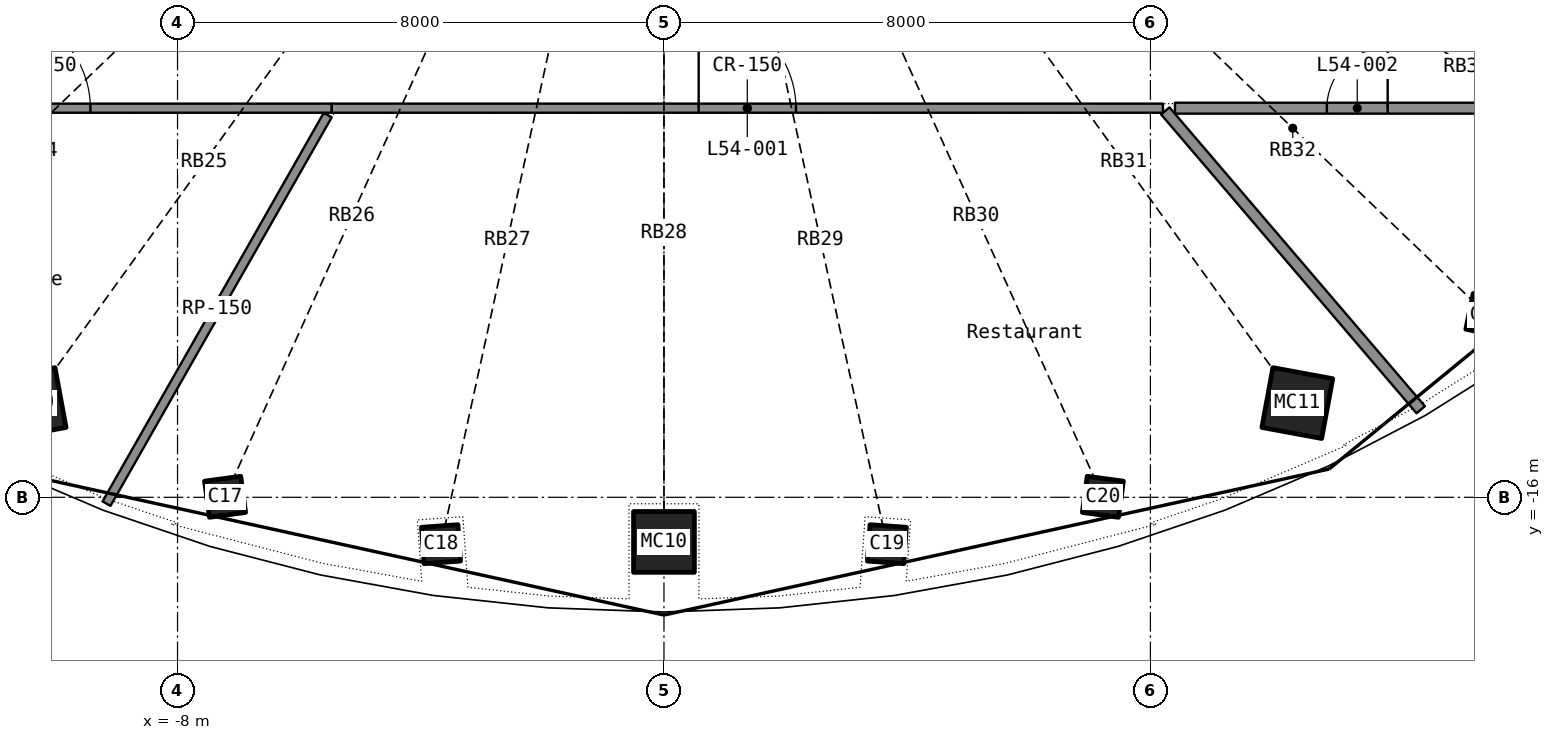
"""IFC4 building model, lengths in metres.
Left out: names, types, materials, properties, quantities, classifications, styles, units other than length and angle.
Written with IfcOpenShell. Run it as: python <this file> out.ifc"""

import sys

from ifc_helpers import new_model, si_unit, direction, frame, frame_2d, origin, origin_2d, place, context, subcontext, project, spatial, rectangle, hollow_rectangle, extrude, element, fill, save


model = new_model("IFC4")
c1 = context("Model", 3, precision=1e-05, world=origin(), true_north=direction((0.0, 1.0)))
c2 = subcontext(c1, "Body", "Model", "MODEL_VIEW")
j1 = project(units=[si_unit("LENGTHUNIT", "METRE"), si_unit("PLANEANGLEUNIT", "RADIAN")], contexts=[c1])
p1 = place(None, origin())
s1 = spatial("IfcSite", under=j1, at=p1, CompositionType="ELEMENT")
p2 = place(p1, origin())
s2 = spatial("IfcBuilding", under=s1, at=p2, CompositionType="ELEMENT")
p3 = place(p2, frame((0.0, 0.0, 224.5)))
s3 = spatial("IfcBuildingStorey", under=s2, at=p3, CompositionType="ELEMENT", Elevation=224.5)
p4 = place(p3, frame((-10.416, -14.45, 0.0), z_axis=(0.017280237, 0.024535299, 0.999549605), x_axis=(-0.908584408, 0.41766567, 0.005455459)))
e1 = element("IfcColumn", 1, at=p4, inside=s3, PredefinedType="COLUMN", context=c2, shape_type="SweptSolid", body=[
    extrude(hollow_rectangle(XDim=1.0, YDim=1.0, WallThickness=0.032, at=origin_2d()), origin(), (0.0, 0.0, 1.0), 3.702),
])
for number, where, z_axis, x_axis in (
    (2, (-7.218, -15.992, 0.0), (0.012, 0.027, 1.0), (-0.96, 0.279, 0.004)),
    (3, (-3.666, -16.771, 0.0), (0.006, 0.028, 1.0), (-0.99, 0.14, 0.002)),
):
    element("IfcColumn", number, at=place(p3, frame(where, z_axis=z_axis, x_axis=x_axis)), inside=s3, PredefinedType="COLUMN", context=c2, shape_type="SweptSolid", body=[
        extrude(hollow_rectangle(XDim=0.6, YDim=0.6, WallThickness=0.025, at=origin_2d()), origin(), (0.0, 0.0, 1.0), 3.701),
    ])
p5 = place(p3, frame((0.0, -16.734, 0.0), z_axis=(0.0, 0.02836206, 0.999597716), x_axis=(-1.0, 0.0, 0.0)))
e4 = element("IfcColumn", 4, at=p5, inside=s3, PredefinedType="COLUMN", context=c2, shape_type="SweptSolid", body=[
    extrude(hollow_rectangle(XDim=1.0, YDim=1.0, WallThickness=0.032, at=origin_2d()), origin(), (0.0, 0.0, 1.0), 3.701),
])
for number, where, z_axis, x_axis in (
    (5, (3.666, -16.771, 0.0), (-0.006, 0.028, 1.0), (-0.99, -0.14, -0.002)),
    (6, (7.218, -15.992, 0.0), (-0.012, 0.027, 1.0), (-0.96, -0.279, -0.004)),
):
    element("IfcColumn", number, at=place(p3, frame(where, z_axis=z_axis, x_axis=x_axis)), inside=s3, PredefinedType="COLUMN", context=c2, shape_type="SweptSolid", body=[
        extrude(hollow_rectangle(XDim=0.6, YDim=0.6, WallThickness=0.025, at=origin_2d()), origin(), (0.0, 0.0, 1.0), 3.701),
    ])
p6 = place(p3, frame((10.416, -14.45, 0.0), z_axis=(-0.017280237, 0.024535299, 0.999549605), x_axis=(-0.908584408, -0.41766567, -0.005455459)))
e7 = element("IfcColumn", 7, at=p6, inside=s3, PredefinedType="COLUMN", context=c2, shape_type="SweptSolid", body=[
    extrude(hollow_rectangle(XDim=1.0, YDim=1.0, WallThickness=0.032, at=origin_2d()), origin(), (0.0, 0.0, 1.0), 3.702),
])
p7 = place(p3, frame((13.542, -13.002, 0.0), z_axis=(-0.022226156, 0.021698532, 0.999517469), x_axis=(-0.828721704, -0.559625686, -0.006279272)))
e8 = element("IfcColumn", 8, at=p7, inside=s3, PredefinedType="COLUMN", context=c2, shape_type="SweptSolid", body=[
    extrude(hollow_rectangle(XDim=0.6, YDim=0.6, WallThickness=0.025, at=origin_2d()), origin(), (0.0, 0.0, 1.0), 3.702),
])
p8 = place(p3, frame((-5.465, -9.6, 0.0), z_axis=(0.0, 0.0, 1.0), x_axis=(1.0, 0.0, 0.0)))
e9 = element("IfcWall", 9, at=p8, inside=s3, PredefinedType="PARTITIONING", context=c2, shape_type="SweptSolid", body=[
    extrude(rectangle(XDim=13.671, YDim=0.15, at=frame_2d((6.836, 0.0))), origin(), (0.0, 0.0, 1.0), 2.4),
])
p9 = place(p8, frame((6.036, 0.0, 0.0)))
e10 = element("IfcOpeningElement", 10, at=p9, cuts=e9, PredefinedType="OPENING", context=c2, shape_type="SweptSolid", body=[
    extrude(rectangle(XDim=1.6, YDim=2.4, at=frame_2d((0.8, 1.2))), frame((0.0, 0.085, 0.0), z_axis=(0.0, -1.0, 0.0), x_axis=(1.0, 0.0, 0.0)), (0.0, 0.0, 1.0), 0.17),
])
p10 = place(p3, frame((-15.0, -9.6, 0.0), z_axis=(0.0, 0.0, 1.0), x_axis=(1.0, 0.0, 0.0)))
e11 = element("IfcWall", 11, at=p10, inside=s3, PredefinedType="PARTITIONING", context=c2, shape_type="SweptSolid", body=[
    extrude(rectangle(XDim=9.534, YDim=0.15, at=frame_2d((4.767, 0.0))), origin(), (0.0, 0.0, 1.0), 2.4),
])
p11 = place(p10, frame((3.967, 0.0, 0.0)))
e12 = element("IfcOpeningElement", 12, at=p11, cuts=e11, PredefinedType="OPENING", context=c2, shape_type="SweptSolid", body=[
    extrude(rectangle(XDim=1.6, YDim=2.4, at=frame_2d((0.8, 1.2))), frame((0.0, 0.085, 0.0), z_axis=(0.0, -1.0, 0.0), x_axis=(1.0, 0.0, 0.0)), (0.0, 0.0, 1.0), 0.17),
])
p12 = place(p3, frame((-5.53, -9.714, 0.0), z_axis=(0.0, 0.0, 1.0), x_axis=(-0.494743906, -0.869038818, 0.0)))
e13 = element("IfcWall", 13, at=p12, inside=s3, PredefinedType="PARTITIONING", context=c2, shape_type="SweptSolid", body=[
    extrude(rectangle(XDim=7.354, YDim=0.15, at=frame_2d((3.677, 0.0))), origin(), (0.0, 0.0, 1.0), 2.4),
])
p13 = place(p3, frame((12.446, -14.56, 0.0), z_axis=(0.0, 0.0, 1.0), x_axis=(-0.649761442, 0.76013819, 0.0)))
e14 = element("IfcWall", 14, at=p13, inside=s3, PredefinedType="PARTITIONING", context=c2, shape_type="SweptSolid", body=[
    extrude(rectangle(XDim=6.465, YDim=0.18, at=frame_2d((3.233, 0.0))), origin(), (0.0, 0.0, 1.0), 2.4),
])
p14 = place(p3, frame((8.404, -9.6, 0.0), z_axis=(0.0, 0.0, 1.0), x_axis=(1.0, 0.0, 0.0)))
e15 = element("IfcWall", 15, at=p14, inside=s3, PredefinedType="PARTITIONING", context=c2, shape_type="SweptSolid", body=[
    extrude(rectangle(XDim=5.996, YDim=0.18, at=frame_2d((2.998, 0.0))), origin(), (0.0, 0.0, 1.0), 2.4),
])
p15 = place(p14, frame((2.498, 0.0, 0.0)))
e16 = element("IfcOpeningElement", 16, at=p15, cuts=e15, PredefinedType="OPENING", context=c2, shape_type="SweptSolid", body=[
    extrude(rectangle(XDim=1.0, YDim=2.1, at=frame_2d((0.5, 1.05))), frame((0.0, 0.1, 0.0), z_axis=(0.0, -1.0, 0.0), x_axis=(1.0, 0.0, 0.0)), (0.0, 0.0, 1.0), 0.2),
])
p16 = place(p9, origin())
e17 = element("IfcDoor", 17, at=p16, inside=s3, OperationType="DOUBLE_DOOR_SINGLE_SWING", PredefinedType="DOOR", context=c2, shape_type="SweptSolid", body=[
    extrude(rectangle(XDim=1.6, YDim=2.4, at=frame_2d((0.8, 1.2))), frame((0.0, 0.025, 0.0), z_axis=(0.0, -1.0, 0.0), x_axis=(1.0, 0.0, 0.0)), (0.0, 0.0, 1.0), 0.05),
])
fill(e10, e17)
p17 = place(p15, origin())
e18 = element("IfcDoor", 18, at=p17, inside=s3, OperationType="SINGLE_SWING_RIGHT", PredefinedType="DOOR", context=c2, shape_type="SweptSolid", body=[
    extrude(rectangle(XDim=1.0, YDim=2.1, at=frame_2d((0.5, 1.05))), frame((0.0, 0.025, 0.0), z_axis=(0.0, -1.0, 0.0), x_axis=(1.0, 0.0, 0.0)), (0.0, 0.0, 1.0), 0.05),
])
fill(e16, e18)
p18 = place(p11, origin())
e19 = element("IfcDoor", 19, at=p18, inside=s3, OperationType="DOUBLE_DOOR_SINGLE_SWING", PredefinedType="DOOR", context=c2, shape_type="SweptSolid", body=[
    extrude(rectangle(XDim=1.6, YDim=2.4, at=frame_2d((0.8, 1.2))), frame((0.0, 0.025, 0.0), z_axis=(0.0, -1.0, 0.0), x_axis=(1.0, 0.0, 0.0)), (0.0, 0.0, 1.0), 0.05),
])
fill(e12, e19)
save(model, sys.argv[1])
